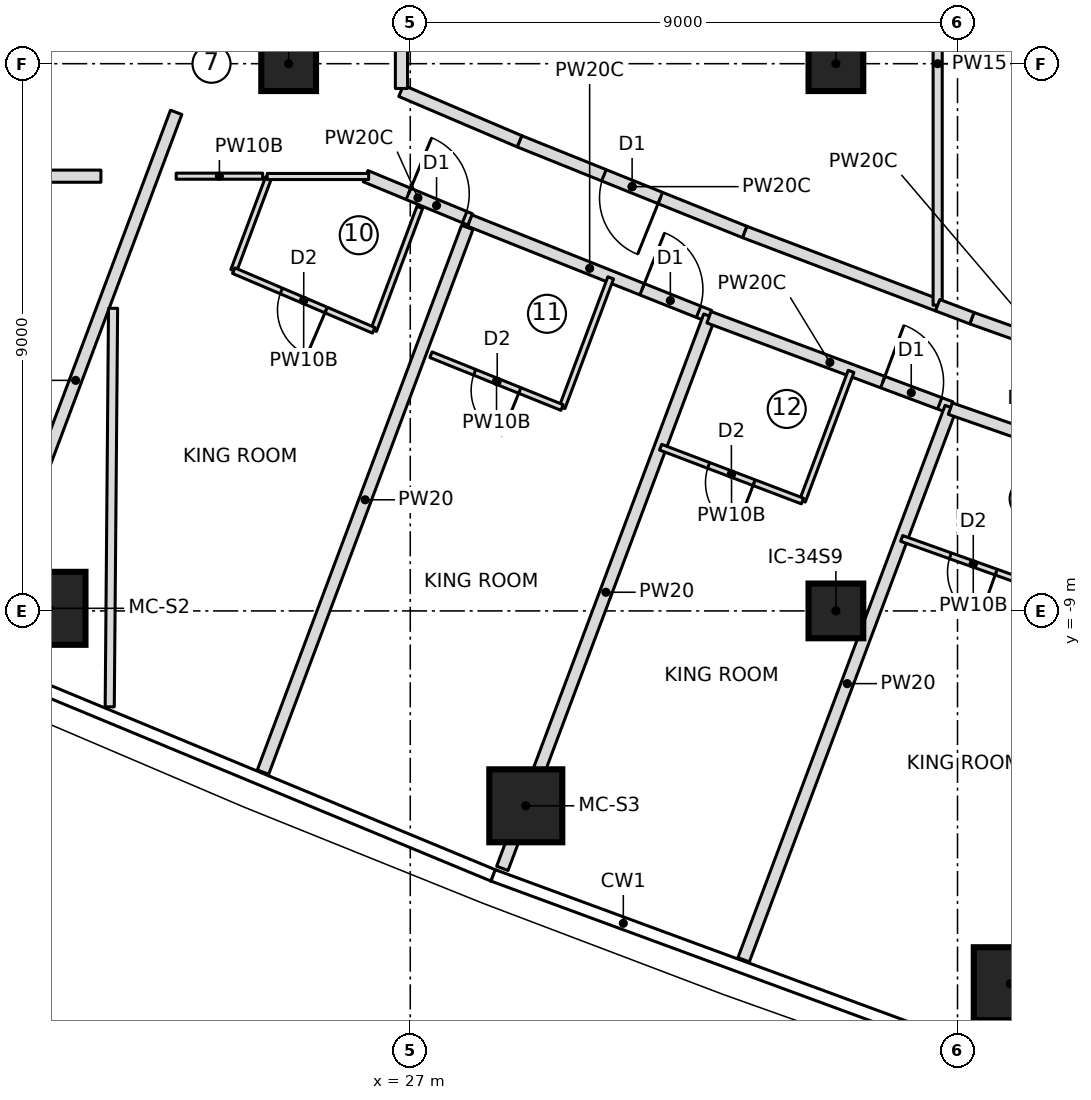
"""IFC4 building model, lengths in metres.
Left out: names, types, materials, properties, quantities, classifications, styles, units other than length and angle.
Written with IfcOpenShell. Run it as: python <this file> out.ifc"""

import sys

from ifc_helpers import new_model, si_unit, direction, frame, frame_2d, origin, origin_2d, place, context, subcontext, project, spatial, rectangle, extrude, element, fill, save


model = new_model("IFC4")
c1 = context("Model", 3, precision=1e-05, world=origin(), true_north=direction((0.0, 1.0)))
c2 = subcontext(c1, "Body", "Model", "MODEL_VIEW")
j1 = project(units=[si_unit("LENGTHUNIT", "METRE"), si_unit("PLANEANGLEUNIT", "RADIAN")], contexts=[c1])
p1 = place(None, origin())
s1 = spatial("IfcSite", under=j1, at=p1, CompositionType="ELEMENT")
p2 = place(p1, origin())
s2 = spatial("IfcBuilding", under=s1, at=p2, CompositionType="ELEMENT")
p3 = place(p2, frame((0.0, 0.0, 245.65)))
s3 = spatial("IfcBuildingStorey", under=s2, at=p3, CompositionType="ELEMENT", Elevation=245.65)
for number, where, z_axis, x_axis in (
    (1, (21.059, -8.958, 0.0), (0.0, 0.0, 1.0), (1.0, 0.0, 0.0)),
    (2, (28.9, -12.205, 0.0), (0.0, 0.0, 1.0), (1.0, 0.0, 0.0)),
    (3, (36.867, -15.132, 0.0), (0.0, 0.0, 1.0), (1.0, 0.0, 0.0)),
):
    element("IfcColumn", number, at=place(p3, frame(where, z_axis=z_axis, x_axis=x_axis)), inside=s3, PredefinedType="COLUMN", context=c2, shape_type="SweptSolid", body=[
        extrude(rectangle(XDim=1.2, YDim=1.2, at=origin_2d()), origin(), (0.0, 0.0, 1.0), 3.55),
    ])
for number, where, z_axis, x_axis in (
    (4, (25.0, 0.0, 0.0), (0.0, 0.0, 1.0), (1.0, 0.0, 0.0)),
    (5, (34.0, -9.0, 0.0), (0.0, 0.0, 1.0), (1.0, 0.0, 0.0)),
    (6, (34.0, 0.0, 0.0), (0.0, 0.0, 1.0), (1.0, 0.0, 0.0)),
):
    element("IfcColumn", number, at=place(p3, frame(where, z_axis=z_axis, x_axis=x_axis)), inside=s3, PredefinedType="COLUMN", context=c2, shape_type="SweptSolid", body=[
        extrude(rectangle(XDim=0.9, YDim=0.9, at=origin_2d()), origin(), (0.0, 0.0, 1.0), 3.55),
    ])
p4 = place(p3, frame((6.725, -1.85, 0.0), z_axis=(0.0, 0.0, 1.0), x_axis=(1.0, 0.0, 0.0)))
e7 = element("IfcWall", 7, at=p4, inside=s3, PredefinedType="PARTITIONING", context=c2, shape_type="SweptSolid", body=[
    extrude(rectangle(XDim=15.188, YDim=0.2, at=frame_2d((7.594, 0.0))), origin(), (0.0, 0.0, 1.0), 3.25),
])
p5 = place(p4, frame((7.257, 0.0, 0.0)))
e8 = element("IfcOpeningElement", 8, at=p5, cuts=e7, PredefinedType="OPENING", context=c2, shape_type="SweptSolid", body=[
    extrude(rectangle(XDim=1.0, YDim=2.1, at=frame_2d((0.5, 1.05))), frame((0.0, 0.11, 0.0), z_axis=(0.0, -1.0, 0.0), x_axis=(1.0, 0.0, 0.0)), (0.0, 0.0, 1.0), 0.22),
])
p6 = place(p3, frame((19.844, -9.616, 0.0), z_axis=(0.0, 0.0, 1.0), x_axis=(0.351123441588, 0.936329177569, 0.0)))
e9 = element("IfcWall", 9, at=p6, inside=s3, PredefinedType="PARTITIONING", context=c2, shape_type="SweptSolid", body=[
    extrude(rectangle(XDim=9.416, YDim=0.2, at=frame_2d((4.708, 0.0))), origin(), (0.0, 0.0, 1.0), 3.25),
])
p7 = place(p3, frame((26.266, -1.85, 0.0), z_axis=(0.0, 0.0, 1.0), x_axis=(0.924055156704, -0.382259162569, 0.0)))
e10 = element("IfcWall", 10, at=p7, inside=s3, PredefinedType="PARTITIONING", context=c2, shape_type="SweptSolid", body=[
    extrude(rectangle(XDim=1.862, YDim=0.2, at=frame_2d((0.931, 0.0))), origin(), (0.0, 0.0, 1.0), 3.25),
])
p8 = place(p7, frame((0.762, 0.0, 0.0)))
e11 = element("IfcOpeningElement", 11, at=p8, cuts=e10, PredefinedType="OPENING", context=c2, shape_type="SweptSolid", body=[
    extrude(rectangle(XDim=1.0, YDim=2.1, at=frame_2d((0.5, 1.05))), frame((0.0, 0.11, 0.0), z_axis=(0.0, -1.0, 0.0), x_axis=(1.0, 0.0, 0.0)), (0.0, 0.0, 1.0), 0.22),
])
p9 = place(p3, frame((24.096, -3.404, 0.0), z_axis=(0.0, 0.0, 1.0), x_axis=(0.351156192753, 0.936316895229, 0.0)))
e12 = element("IfcWall", 12, at=p9, inside=s3, PredefinedType="PARTITIONING", context=c2, shape_type="SweptSolid", body=[
    extrude(rectangle(XDim=1.634, YDim=0.1, at=frame_2d((0.817, 0.0))), origin(), (0.0, 0.0, 1.0), 3.25),
])
p10 = place(p3, frame((27.156, -2.363, 0.0), z_axis=(0.0, 0.0, 1.0), x_axis=(-0.351086267198, -0.936343117124, 0.0)))
e13 = element("IfcWall", 13, at=p10, inside=s3, PredefinedType="PARTITIONING", context=c2, shape_type="SweptSolid", body=[
    extrude(rectangle(XDim=2.159, YDim=0.1, at=frame_2d((1.08, 0.0))), origin(), (0.0, 0.0, 1.0), 3.25),
])
p11 = place(p3, frame((26.398, -4.385, 0.0), z_axis=(0.0, 0.0, 1.0), x_axis=(-0.919870178563, 0.392222965404, 0.0)))
e14 = element("IfcWall", 14, at=p11, inside=s3, PredefinedType="PARTITIONING", context=c2, shape_type="SweptSolid", body=[
    extrude(rectangle(XDim=2.502, YDim=0.1, at=frame_2d((1.251, 0.0))), origin(), (0.0, 0.0, 1.0), 3.25),
])
p12 = place(p11, frame((0.85, 0.0, 0.0)))
e15 = element("IfcOpeningElement", 15, at=p12, cuts=e14, PredefinedType="OPENING", context=c2, shape_type="SweptSolid", body=[
    extrude(rectangle(XDim=0.8, YDim=2.1, at=frame_2d((0.4, 1.05))), frame((0.0, 0.06, 0.0), z_axis=(0.0, -1.0, 0.0), x_axis=(1.0, 0.0, 0.0)), (0.0, 0.0, 1.0), 0.12),
])
p13 = place(p3, frame((24.578, -11.652, 0.0), z_axis=(0.0, 0.0, 1.0), x_axis=(0.351140219871, 0.936322885542, 0.0)))
e16 = element("IfcWall", 16, at=p13, inside=s3, PredefinedType="PARTITIONING", context=c2, shape_type="SweptSolid", body=[
    extrude(rectangle(XDim=9.568, YDim=0.2, at=frame_2d((4.784, 0.0))), origin(), (0.0, 0.0, 1.0), 3.25),
])
p14 = place(p3, frame((27.98, -2.581, 0.0), z_axis=(0.0, 0.0, 1.0), x_axis=(0.928920552813, -0.370279092795, 0.0)))
e17 = element("IfcWall", 17, at=p14, inside=s3, PredefinedType="PARTITIONING", context=c2, shape_type="SweptSolid", body=[
    extrude(rectangle(XDim=4.242, YDim=0.2, at=frame_2d((2.121, 0.0))), origin(), (0.0, 0.0, 1.0), 3.25),
])
p15 = place(p14, frame((3.05, 0.0, 0.0)))
e18 = element("IfcOpeningElement", 18, at=p15, cuts=e17, PredefinedType="OPENING", context=c2, shape_type="SweptSolid", body=[
    extrude(rectangle(XDim=1.0, YDim=2.1, at=frame_2d((0.5, 1.05))), frame((0.0, 0.11, 0.0), z_axis=(0.0, -1.0, 0.0), x_axis=(1.0, 0.0, 0.0)), (0.0, 0.0, 1.0), 0.22),
])
p16 = place(p3, frame((30.296, -3.522, 0.0), z_axis=(0.0, 0.0, 1.0), x_axis=(-0.351099944253, -0.936337988734, 0.0)))
e19 = element("IfcWall", 19, at=p16, inside=s3, PredefinedType="PARTITIONING", context=c2, shape_type="SweptSolid", body=[
    extrude(rectangle(XDim=2.277, YDim=0.1, at=frame_2d((1.139, 0.0))), origin(), (0.0, 0.0, 1.0), 3.25),
])
p17 = place(p3, frame((29.497, -5.655, 0.0), z_axis=(0.0, 0.0, 1.0), x_axis=(-0.927619412923, 0.373526739028, 0.0)))
e20 = element("IfcWall", 20, at=p17, inside=s3, PredefinedType="PARTITIONING", context=c2, shape_type="SweptSolid", body=[
    extrude(rectangle(XDim=2.324, YDim=0.1, at=frame_2d((1.162, 0.0))), origin(), (0.0, 0.0, 1.0), 3.25),
])
p18 = place(p17, frame((0.75, 0.0, 0.0)))
e21 = element("IfcOpeningElement", 21, at=p18, cuts=e20, PredefinedType="OPENING", context=c2, shape_type="SweptSolid", body=[
    extrude(rectangle(XDim=0.8, YDim=2.1, at=frame_2d((0.4, 1.05))), frame((0.0, 0.06, 0.0), z_axis=(0.0, -1.0, 0.0), x_axis=(1.0, 0.0, 0.0)), (0.0, 0.0, 1.0), 0.12),
])
p19 = place(p3, frame((28.514, -13.235, 0.0), z_axis=(0.0, 0.0, 1.0), x_axis=(0.351126199585, 0.936328143316, 0.0)))
e22 = element("IfcWall", 22, at=p19, inside=s3, PredefinedType="PARTITIONING", context=c2, shape_type="SweptSolid", body=[
    extrude(rectangle(XDim=9.701, YDim=0.2, at=frame_2d((4.851, 0.0))), origin(), (0.0, 0.0, 1.0), 3.25),
])
p20 = place(p3, frame((31.913, -4.17, 0.0), z_axis=(0.0, 0.0, 1.0), x_axis=(0.936848300955, -0.349735987565, 0.0)))
e23 = element("IfcWall", 23, at=p20, inside=s3, PredefinedType="PARTITIONING", context=c2, shape_type="SweptSolid", body=[
    extrude(rectangle(XDim=4.244, YDim=0.2, at=frame_2d((2.122, 0.0))), origin(), (0.0, 0.0, 1.0), 3.25),
])
p21 = place(p20, frame((3.05, 0.0, 0.0)))
e24 = element("IfcOpeningElement", 24, at=p21, cuts=e23, PredefinedType="OPENING", context=c2, shape_type="SweptSolid", body=[
    extrude(rectangle(XDim=1.0, YDim=2.1, at=frame_2d((0.5, 1.05))), frame((0.0, 0.11, 0.0), z_axis=(0.0, -1.0, 0.0), x_axis=(1.0, 0.0, 0.0)), (0.0, 0.0, 1.0), 0.22),
])
p22 = place(p3, frame((34.25, -5.061, 0.0), z_axis=(0.0, 0.0, 1.0), x_axis=(-0.351135191353, -0.936324771323, 0.0)))
e25 = element("IfcWall", 25, at=p22, inside=s3, PredefinedType="PARTITIONING", context=c2, shape_type="SweptSolid", body=[
    extrude(rectangle(XDim=2.277, YDim=0.1, at=frame_2d((1.139, 0.0))), origin(), (0.0, 0.0, 1.0), 3.25),
])
p23 = place(p3, frame((33.45, -7.193, 0.0), z_axis=(0.0, 0.0, 1.0), x_axis=(-0.93495051617, 0.354778145202, 0.0)))
e26 = element("IfcWall", 26, at=p23, inside=s3, PredefinedType="PARTITIONING", context=c2, shape_type="SweptSolid", body=[
    extrude(rectangle(XDim=2.495, YDim=0.1, at=frame_2d((1.247, 0.0))), origin(), (0.0, 0.0, 1.0), 3.25),
])
p24 = place(p23, frame((0.85, 0.0, 0.0)))
e27 = element("IfcOpeningElement", 27, at=p24, cuts=e26, PredefinedType="OPENING", context=c2, shape_type="SweptSolid", body=[
    extrude(rectangle(XDim=0.8, YDim=2.1, at=frame_2d((0.4, 1.05))), frame((0.0, 0.06, 0.0), z_axis=(0.0, -1.0, 0.0), x_axis=(1.0, 0.0, 0.0)), (0.0, 0.0, 1.0), 0.12),
])
p25 = place(p3, frame((32.483, -14.738, 0.0), z_axis=(0.0, 0.0, 1.0), x_axis=(0.351117925717, 0.936331246002, 0.0)))
e28 = element("IfcWall", 28, at=p25, inside=s3, PredefinedType="PARTITIONING", context=c2, shape_type="SweptSolid", body=[
    extrude(rectangle(XDim=9.701, YDim=0.2, at=frame_2d((4.851, 0.0))), origin(), (0.0, 0.0, 1.0), 3.25),
])
p26 = place(p3, frame((35.882, -5.673, 0.0), z_axis=(0.0, 0.0, 1.0), x_axis=(0.944107376821, -0.329638075823, 0.0)))
e29 = element("IfcWall", 29, at=p26, inside=s3, PredefinedType="PARTITIONING", context=c2, shape_type="SweptSolid", body=[
    extrude(rectangle(XDim=4.245, YDim=0.2, at=frame_2d((2.122, 0.0))), origin(), (0.0, 0.0, 1.0), 3.25),
])
p27 = place(p26, frame((3.05, 0.0, 0.0)))
e30 = element("IfcOpeningElement", 30, at=p27, cuts=e29, PredefinedType="OPENING", context=c2, shape_type="SweptSolid", body=[
    extrude(rectangle(XDim=1.0, YDim=2.1, at=frame_2d((0.5, 1.05))), frame((0.0, 0.11, 0.0), z_axis=(0.0, -1.0, 0.0), x_axis=(1.0, 0.0, 0.0)), (0.0, 0.0, 1.0), 0.22),
])
p28 = place(p3, frame((37.436, -8.648, 0.0), z_axis=(0.0, 0.0, 1.0), x_axis=(-0.941896455552, 0.335903359641, 0.0)))
e31 = element("IfcWall", 31, at=p28, inside=s3, PredefinedType="PARTITIONING", context=c2, shape_type="SweptSolid", body=[
    extrude(rectangle(XDim=2.5, YDim=0.1, at=frame_2d((1.25, 0.0))), origin(), (0.0, 0.0, 1.0), 3.25),
])
p29 = place(p28, frame((0.85, 0.0, 0.0)))
e32 = element("IfcOpeningElement", 32, at=p29, cuts=e31, PredefinedType="OPENING", context=c2, shape_type="SweptSolid", body=[
    extrude(rectangle(XDim=0.8, YDim=2.1, at=frame_2d((0.4, 1.05))), frame((0.0, 0.06, 0.0), z_axis=(0.0, -1.0, 0.0), x_axis=(1.0, 0.0, 0.0)), (0.0, 0.0, 1.0), 0.12),
])
p30 = place(p3, frame((36.481, -16.161, 0.0), z_axis=(0.0, 0.0, 1.0), x_axis=(0.35112895446, 0.936327110224, 0.0)))
e33 = element("IfcWall", 33, at=p30, inside=s3, PredefinedType="PARTITIONING", context=c2, shape_type="SweptSolid", body=[
    extrude(rectangle(XDim=9.706, YDim=0.2, at=frame_2d((4.853, 0.0))), origin(), (0.0, 0.0, 1.0), 3.25),
])
p31 = place(p3, frame((32.501, -2.768, 0.0), z_axis=(0.0, 0.0, 1.0), x_axis=(-0.927622894464, 0.373518092823, 0.0)))
e34 = element("IfcWall", 34, at=p31, inside=s3, PredefinedType="PARTITIONING", context=c2, shape_type="SweptSolid", body=[
    extrude(rectangle(XDim=3.995, YDim=0.2, at=frame_2d((1.998, 0.0))), origin(), (0.0, 0.0, 1.0), 3.25),
])
p32 = place(p31, frame((1.498, 0.0, 0.0)))
e35 = element("IfcOpeningElement", 35, at=p32, cuts=e34, PredefinedType="OPENING", context=c2, shape_type="SweptSolid", body=[
    extrude(rectangle(XDim=1.0, YDim=2.1, at=frame_2d((0.5, 1.05))), frame((0.0, 0.11, 0.0), z_axis=(0.0, -1.0, 0.0), x_axis=(1.0, 0.0, 0.0)), (0.0, 0.0, 1.0), 0.22),
])
p33 = place(p3, frame((28.796, -1.276, 0.0), z_axis=(0.0, 0.0, 1.0), x_axis=(-0.91990756443, 0.392135273732, 0.0)))
e36 = element("IfcWall", 36, at=p33, inside=s3, PredefinedType="PARTITIONING", context=c2, shape_type="SweptSolid", body=[
    extrude(rectangle(XDim=2.115, YDim=0.2, at=frame_2d((1.058, 0.0))), origin(), (0.0, 0.0, 1.0), 3.25),
])
p34 = place(p3, frame((35.674, -3.972, 0.0), z_axis=(0.0, 0.0, 1.0), x_axis=(-0.93495884859, 0.354756185912, 0.0)))
e37 = element("IfcWall", 37, at=p34, inside=s3, PredefinedType="PARTITIONING", context=c2, shape_type="SweptSolid", body=[
    extrude(rectangle(XDim=3.393, YDim=0.2, at=frame_2d((1.696, 0.0))), origin(), (0.0, 0.0, 1.0), 3.25),
])
p35 = place(p3, frame((35.674, -3.972, 0.0), z_axis=(0.0, 0.0, 1.0), x_axis=(0.0, 1.0, 0.0)))
e38 = element("IfcWall", 38, at=p35, inside=s3, PredefinedType="PARTITIONING", context=c2, shape_type="SweptSolid", body=[
    extrude(rectangle(XDim=7.944, YDim=0.15, at=frame_2d((3.972, 0.0))), origin(), (0.0, 0.0, 1.0), 3.25),
])
p36 = place(p3, frame((38.674, -5.055, 0.0), z_axis=(0.0, 0.0, 1.0), x_axis=(-0.941901902054, 0.335888086879, 0.0)))
e39 = element("IfcWall", 39, at=p36, inside=s3, PredefinedType="PARTITIONING", context=c2, shape_type="SweptSolid", body=[
    extrude(rectangle(XDim=2.588, YDim=0.2, at=frame_2d((1.294, 0.0))), origin(), (0.0, 0.0, 1.0), 3.25),
])
p37 = place(p36, frame((0.794, 0.0, 0.0)))
e40 = element("IfcOpeningElement", 40, at=p37, cuts=e39, PredefinedType="OPENING", context=c2, shape_type="SweptSolid", body=[
    extrude(rectangle(XDim=1.0, YDim=2.1, at=frame_2d((0.5, 1.05))), frame((0.0, 0.11, 0.0), z_axis=(0.0, -1.0, 0.0), x_axis=(1.0, 0.0, 0.0)), (0.0, 0.0, 1.0), 0.22),
])
p38 = place(p3, frame((36.236, -4.186, 0.0), z_axis=(0.0, 0.0, 1.0), x_axis=(-0.934904737906, 0.354898761678, 0.0)))
e41 = element("IfcWall", 41, at=p38, inside=s3, PredefinedType="PARTITIONING", context=c2, shape_type="SweptSolid", body=[
    extrude(rectangle(XDim=0.602, YDim=0.2, at=frame_2d((0.301, 0.0))), origin(), (0.0, 0.0, 1.0), 3.25),
])
p39 = place(p3, frame((22.112, -4.023, 0.0), z_axis=(0.0, 0.0, 1.0), x_axis=(-0.008379594055, -0.999964890585, 0.0)))
e42 = element("IfcWall", 42, at=p39, inside=s3, PredefinedType="PARTITIONING", context=c2, shape_type="SweptSolid", body=[
    extrude(rectangle(XDim=6.555, YDim=0.15, at=frame_2d((3.278, 0.0))), origin(), (0.0, 0.0, 1.0), 3.25),
])
p40 = place(p3, frame((24.647, -1.855, 0.0), z_axis=(0.0, 0.0, 1.0), x_axis=(1.0, 0.0, 0.0)))
e43 = element("IfcWall", 43, at=p40, inside=s3, PredefinedType="PARTITIONING", context=c2, shape_type="SweptSolid", body=[
    extrude(rectangle(XDim=1.669, YDim=0.1, at=frame_2d((0.834, 0.0))), origin(), (0.0, 0.0, 1.0), 3.25),
])
p41 = place(p3, frame((26.855, -0.407, 0.0), z_axis=(0.0, 0.0, 1.0), x_axis=(0.0, 1.0, 0.0)))
e44 = element("IfcWall", 44, at=p41, inside=s3, PredefinedType="PARTITIONING", context=c2, shape_type="SweptSolid", body=[
    extrude(rectangle(XDim=0.814, YDim=0.2, at=frame_2d((0.407, 0.0))), origin(), (0.0, 0.0, 1.0), 3.25),
])
p42 = place(p3, frame((24.572, -1.85, 0.0), z_axis=(0.0, 0.0, 1.0), x_axis=(-1.0, 0.0, 0.0)))
e45 = element("IfcWall", 45, at=p42, inside=s3, PredefinedType="PARTITIONING", context=c2, shape_type="SweptSolid", body=[
    extrude(rectangle(XDim=1.422, YDim=0.1, at=frame_2d((0.711, 0.0))), origin(), (0.0, 0.0, 1.0), 3.25),
])
p43 = place(p12, origin())
e46 = element("IfcDoor", 46, at=p43, inside=s3, OperationType="SINGLE_SWING_LEFT", PredefinedType="DOOR", context=c2, shape_type="SweptSolid", body=[
    extrude(rectangle(XDim=0.8, YDim=2.1, at=frame_2d((0.4, 1.05))), frame((0.0, 0.025, 0.0), z_axis=(0.0, -1.0, 0.0), x_axis=(1.0, 0.0, 0.0)), (0.0, 0.0, 1.0), 0.05),
])
fill(e15, e46)
p44 = place(p8, origin())
e47 = element("IfcDoor", 47, at=p44, inside=s3, OperationType="SINGLE_SWING_LEFT", PredefinedType="DOOR", context=c2, shape_type="SweptSolid", body=[
    extrude(rectangle(XDim=1.0, YDim=2.1, at=frame_2d((0.5, 1.05))), frame((0.0, 0.025, 0.0), z_axis=(0.0, -1.0, 0.0), x_axis=(1.0, 0.0, 0.0)), (0.0, 0.0, 1.0), 0.05),
])
fill(e11, e47)
p45 = place(p18, origin())
e48 = element("IfcDoor", 48, at=p45, inside=s3, OperationType="SINGLE_SWING_LEFT", PredefinedType="DOOR", context=c2, shape_type="SweptSolid", body=[
    extrude(rectangle(XDim=0.8, YDim=2.1, at=frame_2d((0.4, 1.05))), frame((0.0, 0.025, 0.0), z_axis=(0.0, -1.0, 0.0), x_axis=(1.0, 0.0, 0.0)), (0.0, 0.0, 1.0), 0.05),
])
fill(e21, e48)
p46 = place(p15, origin())
e49 = element("IfcDoor", 49, at=p46, inside=s3, OperationType="SINGLE_SWING_LEFT", PredefinedType="DOOR", context=c2, shape_type="SweptSolid", body=[
    extrude(rectangle(XDim=1.0, YDim=2.1, at=frame_2d((0.5, 1.05))), frame((0.0, 0.025, 0.0), z_axis=(0.0, -1.0, 0.0), x_axis=(1.0, 0.0, 0.0)), (0.0, 0.0, 1.0), 0.05),
])
fill(e18, e49)
p47 = place(p24, origin())
e50 = element("IfcDoor", 50, at=p47, inside=s3, OperationType="SINGLE_SWING_LEFT", PredefinedType="DOOR", context=c2, shape_type="SweptSolid", body=[
    extrude(rectangle(XDim=0.8, YDim=2.1, at=frame_2d((0.4, 1.05))), frame((0.0, 0.025, 0.0), z_axis=(0.0, -1.0, 0.0), x_axis=(1.0, 0.0, 0.0)), (0.0, 0.0, 1.0), 0.05),
])
fill(e27, e50)
p48 = place(p21, origin())
e51 = element("IfcDoor", 51, at=p48, inside=s3, OperationType="SINGLE_SWING_LEFT", PredefinedType="DOOR", context=c2, shape_type="SweptSolid", body=[
    extrude(rectangle(XDim=1.0, YDim=2.1, at=frame_2d((0.5, 1.05))), frame((0.0, 0.025, 0.0), z_axis=(0.0, -1.0, 0.0), x_axis=(1.0, 0.0, 0.0)), (0.0, 0.0, 1.0), 0.05),
])
fill(e24, e51)
p49 = place(p29, origin())
e52 = element("IfcDoor", 52, at=p49, inside=s3, OperationType="SINGLE_SWING_LEFT", PredefinedType="DOOR", context=c2, shape_type="SweptSolid", body=[
    extrude(rectangle(XDim=0.8, YDim=2.1, at=frame_2d((0.4, 1.05))), frame((0.0, 0.025, 0.0), z_axis=(0.0, -1.0, 0.0), x_axis=(1.0, 0.0, 0.0)), (0.0, 0.0, 1.0), 0.05),
])
fill(e32, e52)
p50 = place(p32, origin())
e53 = element("IfcDoor", 53, at=p50, inside=s3, OperationType="SINGLE_SWING_LEFT", PredefinedType="DOOR", context=c2, shape_type="SweptSolid", body=[
    extrude(rectangle(XDim=1.0, YDim=2.1, at=frame_2d((0.5, 1.05))), frame((0.0, 0.025, 0.0), z_axis=(0.0, -1.0, 0.0), x_axis=(1.0, 0.0, 0.0)), (0.0, 0.0, 1.0), 0.05),
])
fill(e35, e53)
save(model, sys.argv[1])
